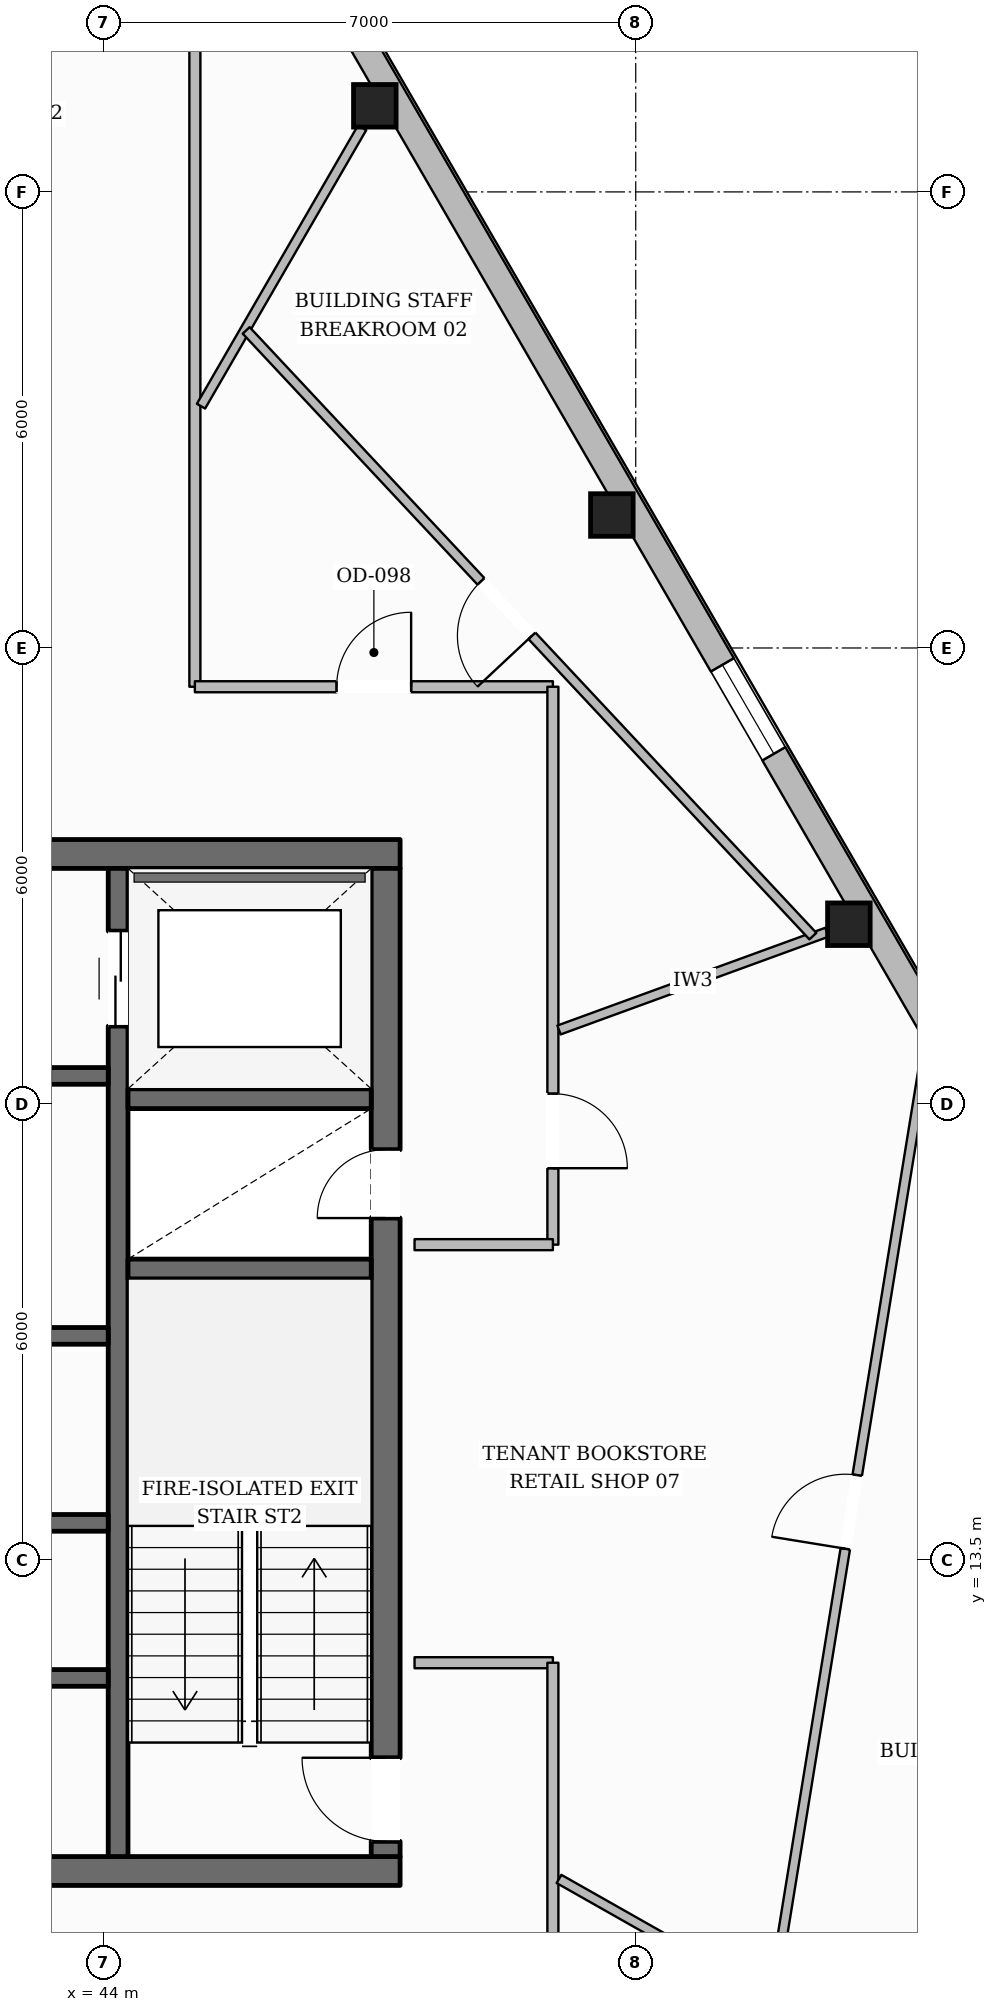
"""IFC4 building model, lengths in metres.
Left out: names, types, materials, properties, quantities, classifications, styles, units other than length and angle.
Written with IfcOpenShell. Run it as: python <this file> out.ifc"""

import sys

from ifc_helpers import new_model, si_unit, direction, frame, frame_2d, origin, origin_2d, place, context, subcontext, project, spatial, rectangle, hollow_rectangle, extrude, element, fill, save


model = new_model("IFC4")
c1 = context("Model", 3, precision=1e-05, world=origin(), true_north=direction((0.0, 1.0)))
c2 = subcontext(c1, "Body", "Model", "MODEL_VIEW")
j1 = project(units=[si_unit("LENGTHUNIT", "METRE"), si_unit("PLANEANGLEUNIT", "RADIAN")], contexts=[c1])
p1 = place(None, origin())
s1 = spatial("IfcSite", under=j1, at=p1, CompositionType="ELEMENT")
p2 = place(p1, origin())
s2 = spatial("IfcBuilding", under=s1, at=p2, CompositionType="ELEMENT")
p3 = place(p2, frame((0.0, 0.0, 247.2)))
s3 = spatial("IfcBuildingStorey", under=s2, at=p3, CompositionType="ELEMENT", Elevation=247.2)
p4 = place(p3, frame((28.1, 9.41, 0.0), z_axis=(0.0, 0.0, 1.0), x_axis=(1.0, 0.0, 0.0)))
e1 = element("IfcWall", 1, at=p4, inside=s3, PredefinedType="SOLIDWALL", context=c2, shape_type="SweptSolid", body=[
    extrude(rectangle(XDim=19.8, YDim=0.38, at=frame_2d((9.9, 0.0))), origin(), (0.0, 0.0, 1.0), 3.61),
])
p5 = place(p4, frame((10.4, 0.0, 0.0)))
e2 = element("IfcOpeningElement", 2, at=p5, cuts=e1, PredefinedType="OPENING", context=c2, shape_type="SweptSolid", body=[
    extrude(rectangle(XDim=1.4, YDim=2.2, at=frame_2d((0.7, 1.1))), frame((0.0, 0.2, 0.0), z_axis=(0.0, -1.0, 0.0), x_axis=(1.0, 0.0, 0.0)), (0.0, 0.0, 1.0), 0.4),
])
p6 = place(p3, frame((28.1, 22.79, 0.0), z_axis=(0.0, 0.0, 1.0), x_axis=(1.0, 0.0, 0.0)))
e3 = element("IfcWall", 3, at=p6, inside=s3, PredefinedType="SOLIDWALL", context=c2, shape_type="SweptSolid", body=[
    extrude(rectangle(XDim=19.8, YDim=0.38, at=frame_2d((9.9, 0.0))), origin(), (0.0, 0.0, 1.0), 3.61),
])
p7 = place(p6, frame((6.175, 0.0, 0.0)))
e4 = element("IfcOpeningElement", 4, at=p7, cuts=e3, PredefinedType="OPENING", context=c2, shape_type="SweptSolid", body=[
    extrude(rectangle(XDim=1.05, YDim=2.15, at=frame_2d((0.525, 1.075))), frame((0.0, 0.2, 0.0), z_axis=(0.0, -1.0, 0.0), x_axis=(1.0, 0.0, 0.0)), (0.0, 0.0, 1.0), 0.4),
])
p8 = place(p6, frame((12.575, 0.0, 0.0)))
e5 = element("IfcOpeningElement", 5, at=p8, cuts=e3, PredefinedType="OPENING", context=c2, shape_type="SweptSolid", body=[
    extrude(rectangle(XDim=1.05, YDim=2.15, at=frame_2d((0.525, 1.075))), frame((0.0, 0.2, 0.0), z_axis=(0.0, -1.0, 0.0), x_axis=(1.0, 0.0, 0.0)), (0.0, 0.0, 1.0), 0.4),
])
p9 = place(p3, frame((47.71, 9.6, 0.0), z_axis=(0.0, 0.0, 1.0), x_axis=(0.0, 1.0, 0.0)))
e6 = element("IfcWall", 6, at=p9, inside=s3, PredefinedType="SOLIDWALL", context=c2, shape_type="SweptSolid", body=[
    extrude(rectangle(XDim=13.0, YDim=0.38, at=frame_2d((6.5, 0.0))), origin(), (0.0, 0.0, 1.0), 3.61),
])
p10 = place(p9, frame((0.2, 0.0, 0.0)))
e7 = element("IfcOpeningElement", 7, at=p10, cuts=e6, PredefinedType="OPENING", context=c2, shape_type="SweptSolid", body=[
    extrude(rectangle(XDim=1.1, YDim=2.15, at=frame_2d((0.55, 1.075))), frame((0.0, 0.2, 0.0), z_axis=(0.0, -1.0, 0.0), x_axis=(1.0, 0.0, 0.0)), (0.0, 0.0, 1.0), 0.4),
])
p11 = place(p9, frame((8.4, 0.0, 0.0)))
e8 = element("IfcOpeningElement", 8, at=p11, cuts=e6, PredefinedType="OPENING", context=c2, shape_type="SweptSolid", body=[
    extrude(rectangle(XDim=0.9, YDim=2.1, at=frame_2d((0.45, 1.05))), frame((0.0, 0.2, 0.0), z_axis=(0.0, -1.0, 0.0), x_axis=(1.0, 0.0, 0.0)), (0.0, 0.0, 1.0), 0.4),
])
p12 = place(p3, frame((44.19, 9.6, 0.0), z_axis=(0.0, 0.0, 1.0), x_axis=(0.0, 1.0, 0.0)))
e9 = element("IfcWall", 9, at=p12, inside=s3, PredefinedType="SHEAR", context=c2, shape_type="SweptSolid", body=[
    extrude(rectangle(XDim=13.0, YDim=0.26, at=frame_2d((6.5, 0.0))), origin(), (0.0, 0.0, 1.0), 3.61),
])
p13 = place(p12, frame((10.925, 0.0, 0.0)))
e10 = element("IfcOpeningElement", 10, at=p13, cuts=e9, PredefinedType="OPENING", context=c2, shape_type="SweptSolid", body=[
    extrude(rectangle(XDim=1.25, YDim=2.25, at=frame_2d((0.625, 1.125))), frame((0.0, 0.14, 0.0), z_axis=(0.0, -1.0, 0.0), x_axis=(1.0, 0.0, 0.0)), (0.0, 0.0, 1.0), 0.28),
])
for number, where, z_axis, x_axis in (
    (11, (44.32, 17.33, 0.0), (0.0, 0.0, 1.0), (1.0, 0.0, 0.0)),
    (12, (44.32, 19.57, 0.0), (0.0, 0.0, 1.0), (1.0, 0.0, 0.0)),
):
    element("IfcWall", number, at=place(p3, frame(where, z_axis=z_axis, x_axis=x_axis)), inside=s3, PredefinedType="SHEAR", context=c2, shape_type="SweptSolid", body=[
        extrude(rectangle(XDim=3.2, YDim=0.26, at=frame_2d((1.6, 0.0))), origin(), (0.0, 0.0, 1.0), 3.61),
    ])
p14 = place(p3, frame((31.94, 19.87, 0.0), z_axis=(0.0, 0.0, 1.0), x_axis=(1.0, 0.0, 0.0)))
e13 = element("IfcWall", 13, at=p14, inside=s3, PredefinedType="SOLIDWALL", context=c2, shape_type="SweptSolid", body=[
    extrude(rectangle(XDim=12.12, YDim=0.22, at=frame_2d((6.06, 0.0))), origin(), (0.0, 0.0, 1.0), 3.61),
])
p15 = place(p14, frame((6.3, 0.0, 0.0)))
e14 = element("IfcOpeningElement", 14, at=p15, cuts=e13, PredefinedType="OPENING", context=c2, shape_type="SweptSolid", body=[
    extrude(rectangle(XDim=1.1, YDim=2.15, at=frame_2d((0.55, 1.075))), frame((0.0, 0.12, 0.0), z_axis=(0.0, -1.0, 0.0), x_axis=(1.0, 0.0, 0.0)), (0.0, 0.0, 1.0), 0.24),
])
p16 = place(p14, frame((8.23, 0.0, 0.0)))
e15 = element("IfcOpeningElement", 15, at=p16, cuts=e13, PredefinedType="OPENING", context=c2, shape_type="SweptSolid", body=[
    extrude(rectangle(XDim=0.9, YDim=2.1, at=frame_2d((0.45, 1.05))), frame((0.0, 0.12, 0.0), z_axis=(0.0, -1.0, 0.0), x_axis=(1.0, 0.0, 0.0)), (0.0, 0.0, 1.0), 0.24),
])
p17 = place(p14, frame((10.45, 0.0, 0.0)))
e16 = element("IfcOpeningElement", 16, at=p17, cuts=e13, PredefinedType="OPENING", context=c2, shape_type="SweptSolid", body=[
    extrude(rectangle(XDim=0.9, YDim=2.1, at=frame_2d((0.45, 1.05))), frame((0.0, 0.12, 0.0), z_axis=(0.0, -1.0, 0.0), x_axis=(1.0, 0.0, 0.0)), (0.0, 0.0, 1.0), 0.24),
])
p18 = place(p3, frame((31.94, 16.45, 0.0), z_axis=(0.0, 0.0, 1.0), x_axis=(1.0, 0.0, 0.0)))
e17 = element("IfcWall", 17, at=p18, inside=s3, PredefinedType="SOLIDWALL", context=c2, shape_type="SweptSolid", body=[
    extrude(rectangle(XDim=12.12, YDim=0.22, at=frame_2d((6.06, 0.0))), origin(), (0.0, 0.0, 1.0), 3.61),
])
p19 = place(p3, frame((31.94, 13.99, 0.0), z_axis=(0.0, 0.0, 1.0), x_axis=(1.0, 0.0, 0.0)))
e18 = element("IfcWall", 18, at=p19, inside=s3, PredefinedType="SOLIDWALL", context=c2, shape_type="SweptSolid", body=[
    extrude(rectangle(XDim=12.12, YDim=0.22, at=frame_2d((6.06, 0.0))), origin(), (0.0, 0.0, 1.0), 3.61),
])
p20 = place(p19, frame((3.11, 0.0, 0.0)))
e19 = element("IfcOpeningElement", 19, at=p20, cuts=e18, PredefinedType="OPENING", context=c2, shape_type="SweptSolid", body=[
    extrude(rectangle(XDim=0.9, YDim=2.1, at=frame_2d((0.45, 1.05))), frame((0.0, 0.12, 0.0), z_axis=(0.0, -1.0, 0.0), x_axis=(1.0, 0.0, 0.0)), (0.0, 0.0, 1.0), 0.24),
])
p21 = place(p19, frame((9.21, 0.0, 0.0)))
e20 = element("IfcOpeningElement", 20, at=p21, cuts=e18, PredefinedType="OPENING", context=c2, shape_type="SweptSolid", body=[
    extrude(rectangle(XDim=0.9, YDim=2.1, at=frame_2d((0.45, 1.05))), frame((0.0, 0.12, 0.0), z_axis=(0.0, -1.0, 0.0), x_axis=(1.0, 0.0, 0.0)), (0.0, 0.0, 1.0), 0.24),
])
p22 = place(p3, frame((40.28, 11.95, 0.0), z_axis=(0.0, 0.0, 1.0), x_axis=(1.0, 0.0, 0.0)))
e21 = element("IfcWall", 21, at=p22, inside=s3, PredefinedType="SOLIDWALL", context=c2, shape_type="SweptSolid", body=[
    extrude(rectangle(XDim=3.78, YDim=0.22, at=frame_2d((1.89, 0.0))), origin(), (0.0, 0.0, 1.0), 3.61),
])
p23 = place(p22, frame((1.55, 0.0, 0.0)))
e22 = element("IfcOpeningElement", 22, at=p23, cuts=e21, PredefinedType="OPENING", context=c2, shape_type="SweptSolid", body=[
    extrude(rectangle(XDim=0.9, YDim=2.1, at=frame_2d((0.45, 1.05))), frame((0.0, 0.12, 0.0), z_axis=(0.0, -1.0, 0.0), x_axis=(1.0, 0.0, 0.0)), (0.0, 0.0, 1.0), 0.24),
])
for number, where, z_axis, x_axis in (
    (23, (53.804, 21.866, 0.0), (0.0, 0.0, 1.0), (1.0, 0.0, 0.0)),
    (24, (50.686, 27.249, 0.0), (0.0, 0.0, 1.0), (1.0, 0.0, 0.0)),
    (25, (47.567, 32.633, 0.0), (0.0, 0.0, 1.0), (1.0, 0.0, 0.0)),
):
    element("IfcColumn", number, at=place(p3, frame(where, z_axis=z_axis, x_axis=x_axis)), inside=s3, PredefinedType="COLUMN", context=c2, shape_type="SweptSolid", body=[
        extrude(hollow_rectangle(XDim=0.56, YDim=0.56, WallThickness=0.025, at=origin_2d()), origin(), (0.0, 0.0, 1.0), 3.61),
    ])
p24 = place(p3, frame((41.327, 43.945, 0.0), z_axis=(0.0, 0.0, 1.0), x_axis=(0.501242173683, -0.865307045691, 0.0)))
e26 = element("IfcWall", 26, at=p24, inside=s3, PredefinedType="STANDARD", context=c2, shape_type="SweptSolid", body=[
    extrude(rectangle(XDim=38.277, YDim=0.35, at=frame_2d((19.138, 0.0))), origin(), (0.0, 0.0, 1.0), 3.196),
])
p25 = place(p24, frame((9.169, 0.0, 0.0)))
e27 = element("IfcOpeningElement", 27, at=p25, cuts=e26, PredefinedType="OPENING", context=c2, shape_type="SweptSolid", body=[
    extrude(rectangle(XDim=1.0, YDim=2.2, at=frame_2d((0.5, 1.1))), frame((0.0, 0.185, 0.0), z_axis=(0.0, -1.0, 0.0), x_axis=(1.0, 0.0, 0.0)), (0.0, 0.0, 1.0), 0.37),
])
p26 = place(p24, frame((34.016, 0.0, 0.65)))
e28 = element("IfcOpeningElement", 28, at=p26, cuts=e26, PredefinedType="OPENING", context=c2, shape_type="SweptSolid", body=[
    extrude(rectangle(XDim=1.35, YDim=1.75, at=frame_2d((0.675, 0.875))), frame((0.0, 0.185, 0.0), z_axis=(0.0, -1.0, 0.0), x_axis=(1.0, 0.0, 0.0)), (0.0, 0.0, 1.0), 0.37),
])
p27 = place(p24, frame((27.795, 0.0, 0.65)))
e29 = element("IfcOpeningElement", 29, at=p27, cuts=e26, PredefinedType="OPENING", context=c2, shape_type="SweptSolid", body=[
    extrude(rectangle(XDim=1.35, YDim=1.75, at=frame_2d((0.675, 0.875))), frame((0.0, 0.185, 0.0), z_axis=(0.0, -1.0, 0.0), x_axis=(1.0, 0.0, 0.0)), (0.0, 0.0, 1.0), 0.37),
])
p28 = place(p24, frame((21.573, 0.0, 0.65)))
e30 = element("IfcOpeningElement", 30, at=p28, cuts=e26, PredefinedType="OPENING", context=c2, shape_type="SweptSolid", body=[
    extrude(rectangle(XDim=1.35, YDim=1.75, at=frame_2d((0.675, 0.875))), frame((0.0, 0.185, 0.0), z_axis=(0.0, -1.0, 0.0), x_axis=(1.0, 0.0, 0.0)), (0.0, 0.0, 1.0), 0.37),
])
p29 = place(p24, frame((2.909, 0.0, 0.65)))
e31 = element("IfcOpeningElement", 31, at=p29, cuts=e26, PredefinedType="OPENING", context=c2, shape_type="SweptSolid", body=[
    extrude(rectangle(XDim=1.35, YDim=1.75, at=frame_2d((0.675, 0.875))), frame((0.0, 0.185, 0.0), z_axis=(0.0, -1.0, 0.0), x_axis=(1.0, 0.0, 0.0)), (0.0, 0.0, 1.0), 0.37),
])
p30 = place(p3, frame((45.2, 34.4, 0.0), z_axis=(0.0, 0.0, 1.0), x_axis=(0.0, -1.0, 0.0)))
e32 = element("IfcWall", 32, at=p30, inside=s3, PredefinedType="PARTITIONING", context=c2, shape_type="SweptSolid", body=[
    extrude(rectangle(XDim=9.41, YDim=0.145, at=frame_2d((4.705, 0.0))), origin(), (0.0, 0.0, 1.0), 3.61),
])
p31 = place(p3, frame((45.2, 24.99, 0.0), z_axis=(0.0, 0.0, 1.0), x_axis=(1.0, 0.0, 0.0)))
e33 = element("IfcWall", 33, at=p31, inside=s3, PredefinedType="PARTITIONING", context=c2, shape_type="SweptSolid", body=[
    extrude(rectangle(XDim=4.71, YDim=0.145, at=frame_2d((2.355, 0.0))), origin(), (0.0, 0.0, 1.0), 3.61),
])
p32 = place(p31, frame((1.865, 0.0, 0.0)))
e34 = element("IfcOpeningElement", 34, at=p32, cuts=e33, PredefinedType="OPENING", context=c2, shape_type="SweptSolid", body=[
    extrude(rectangle(XDim=0.98, YDim=2.15, at=frame_2d((0.49, 1.075))), frame((0.0, 0.083, 0.0), z_axis=(0.0, -1.0, 0.0), x_axis=(1.0, 0.0, 0.0)), (0.0, 0.0, 1.0), 0.165),
])
p33 = place(p3, frame((49.91, 24.99, 0.0), z_axis=(0.0, 0.0, 1.0), x_axis=(0.0, -1.0, 0.0)))
e35 = element("IfcWall", 35, at=p33, inside=s3, PredefinedType="PARTITIONING", context=c2, shape_type="SweptSolid", body=[
    extrude(rectangle(XDim=7.34, YDim=0.145, at=frame_2d((3.67, 0.0))), origin(), (0.0, 0.0, 1.0), 3.349),
])
p34 = place(p33, frame((5.354, 0.0, 0.0)))
e36 = element("IfcOpeningElement", 36, at=p34, cuts=e35, PredefinedType="OPENING", context=c2, shape_type="SweptSolid", body=[
    extrude(rectangle(XDim=0.98, YDim=2.15, at=frame_2d((0.49, 1.075))), frame((0.0, 0.083, 0.0), z_axis=(0.0, -1.0, 0.0), x_axis=(1.0, 0.0, 0.0)), (0.0, 0.0, 1.0), 0.165),
])
for number, where, z_axis, x_axis in (
    (37, (49.91, 17.65, 0.0), (0.0, 0.0, 1.0), (-1.0, 0.0, 0.0)),
    (38, (48.09, 12.15, 0.0), (0.0, 0.0, 1.0), (1.0, 0.0, 0.0)),
):
    element("IfcWall", number, at=place(p3, frame(where, z_axis=z_axis, x_axis=x_axis)), inside=s3, PredefinedType="PARTITIONING", context=c2, shape_type="SweptSolid", body=[
        extrude(rectangle(XDim=1.82, YDim=0.145, at=frame_2d((0.91, 0.0))), origin(), (0.0, 0.0, 1.0), 3.61),
    ])
p35 = place(p3, frame((49.91, 12.15, 0.0), z_axis=(0.0, 0.0, 1.0), x_axis=(0.0, -1.0, 0.0)))
e39 = element("IfcWall", 39, at=p35, inside=s3, PredefinedType="PARTITIONING", context=c2, shape_type="SweptSolid", body=[
    extrude(rectangle(XDim=4.94, YDim=0.145, at=frame_2d((2.47, 0.0))), origin(), (0.0, 0.0, 1.0), 3.61),
])
p36 = place(p3, frame((49.99, 20.474, 0.0), z_axis=(0.0, 0.0, 1.0), x_axis=(0.939443445382, 0.342703972735, 0.0)))
e40 = element("IfcWall", 40, at=p36, inside=s3, PredefinedType="PARTITIONING", context=c2, shape_type="SweptSolid", body=[
    extrude(rectangle(XDim=3.753, YDim=0.125, at=frame_2d((1.876, 0.0))), origin(), (0.0, 0.0, 1.0), 3.61),
])
p37 = place(p3, frame((45.281, 28.681, 0.0), z_axis=(0.0, 0.0, 1.0), x_axis=(0.500877108651, 0.8655184123, 0.0)))
e41 = element("IfcWall", 41, at=p37, inside=s3, PredefinedType="PARTITIONING", context=c2, shape_type="SweptSolid", body=[
    extrude(rectangle(XDim=4.233, YDim=0.125, at=frame_2d((2.116, 0.0))), origin(), (0.0, 0.0, 1.0), 3.61),
])
p38 = place(p3, frame((49.99, 9.305, 0.0), z_axis=(0.0, 0.0, 1.0), x_axis=(0.870028652136, -0.49300116071, 0.0)))
e42 = element("IfcWall", 42, at=p38, inside=s3, PredefinedType="PARTITIONING", context=c2, shape_type="SweptSolid", body=[
    extrude(rectangle(XDim=7.557, YDim=0.125, at=frame_2d((3.779, 0.0))), origin(), (0.0, 0.0, 1.0), 3.246),
])
p39 = place(p3, frame((53.331, 21.709, 0.0), z_axis=(0.0, 0.0, 1.0), x_axis=(-0.683203310533, 0.730228208491, 0.0)))
e43 = element("IfcWall", 43, at=p39, inside=s3, PredefinedType="PARTITIONING", context=c2, shape_type="SweptSolid", body=[
    extrude(rectangle(XDim=10.913, YDim=0.125, at=frame_2d((5.457, 0.0))), origin(), (0.0, 0.0, 1.0), 3.349),
])
p40 = place(p39, frame((5.411, 0.0, 0.0)))
e44 = element("IfcOpeningElement", 44, at=p40, cuts=e43, PredefinedType="OPENING", context=c2, shape_type="SweptSolid", body=[
    extrude(rectangle(XDim=0.98, YDim=2.15, at=frame_2d((0.49, 1.075))), frame((0.0, 0.073, 0.0), z_axis=(0.0, -1.0, 0.0), x_axis=(1.0, 0.0, 0.0)), (0.0, 0.0, 1.0), 0.145),
])
p41 = place(p3, frame((52.796, 7.733, 0.0), z_axis=(0.0, 0.0, 1.0), x_axis=(0.160388372881, 0.987053985274, 0.0)))
e45 = element("IfcWall", 45, at=p41, inside=s3, PredefinedType="PARTITIONING", context=c2, shape_type="SweptSolid", body=[
    extrude(rectangle(XDim=12.748, YDim=0.125, at=frame_2d((6.374, 0.0))), origin(), (0.0, 0.0, 1.0), 3.349),
])
p42 = place(p41, frame((5.995, 0.0, 0.0)))
e46 = element("IfcOpeningElement", 46, at=p42, cuts=e45, PredefinedType="OPENING", context=c2, shape_type="SweptSolid", body=[
    extrude(rectangle(XDim=0.98, YDim=2.15, at=frame_2d((0.49, 1.075))), frame((0.0, 0.073, 0.0), z_axis=(0.0, -1.0, 0.0), x_axis=(1.0, 0.0, 0.0)), (0.0, 0.0, 1.0), 0.145),
])
p43 = place(p28, origin())
e47 = element("IfcWindow", 47, at=p43, inside=s3, PartitioningType="SINGLE_PANEL", PredefinedType="WINDOW", context=c2, shape_type="SweptSolid", body=[
    extrude(rectangle(XDim=1.35, YDim=1.75, at=frame_2d((0.675, 0.875))), frame((0.0, 0.03, 0.0), z_axis=(0.0, -1.0, 0.0), x_axis=(1.0, 0.0, 0.0)), (0.0, 0.0, 1.0), 0.06),
])
fill(e30, e47)
p44 = place(p10, origin())
e48 = element("IfcDoor", 48, at=p44, inside=s3, OperationType="SINGLE_SWING_RIGHT", PredefinedType="DOOR", context=c2, shape_type="SweptSolid", body=[
    extrude(rectangle(XDim=1.1, YDim=2.15, at=frame_2d((0.55, 1.075))), frame((0.0, 0.025, 0.0), z_axis=(0.0, -1.0, 0.0), x_axis=(1.0, 0.0, 0.0)), (0.0, 0.0, 1.0), 0.05),
])
fill(e7, e48)
p45 = place(p11, origin())
e49 = element("IfcDoor", 49, at=p45, inside=s3, OperationType="SINGLE_SWING_LEFT", PredefinedType="DOOR", context=c2, shape_type="SweptSolid", body=[
    extrude(rectangle(XDim=0.9, YDim=2.1, at=frame_2d((0.45, 1.05))), frame((0.0, 0.025, 0.0), z_axis=(0.0, -1.0, 0.0), x_axis=(1.0, 0.0, 0.0)), (0.0, 0.0, 1.0), 0.05),
])
fill(e8, e49)
p46 = place(p13, origin())
e50 = element("IfcDoor", 50, at=p46, inside=s3, OperationType="DOUBLE_DOOR_SLIDING", PredefinedType="DOOR", context=c2, shape_type="SweptSolid", body=[
    extrude(rectangle(XDim=1.25, YDim=2.25, at=frame_2d((0.625, 1.125))), frame((0.0, 0.025, 0.0), z_axis=(0.0, -1.0, 0.0), x_axis=(1.0, 0.0, 0.0)), (0.0, 0.0, 1.0), 0.05),
])
fill(e10, e50)
p47 = place(p32, origin())
e51 = element("IfcDoor", 51, at=p47, inside=s3, OperationType="SINGLE_SWING_RIGHT", PredefinedType="DOOR", context=c2, shape_type="SweptSolid", body=[
    extrude(rectangle(XDim=0.98, YDim=2.15, at=frame_2d((0.49, 1.075))), frame((0.0, 0.025, 0.0), z_axis=(0.0, -1.0, 0.0), x_axis=(1.0, 0.0, 0.0)), (0.0, 0.0, 1.0), 0.05),
])
fill(e34, e51)
p48 = place(p40, origin())
e52 = element("IfcDoor", 52, at=p48, inside=s3, OperationType="SINGLE_SWING_LEFT", PredefinedType="DOOR", context=c2, shape_type="SweptSolid", body=[
    extrude(rectangle(XDim=0.98, YDim=2.15, at=frame_2d((0.49, 1.075))), frame((0.0, 0.025, 0.0), z_axis=(0.0, -1.0, 0.0), x_axis=(1.0, 0.0, 0.0)), (0.0, 0.0, 1.0), 0.05),
])
fill(e44, e52)
p49 = place(p34, origin())
e53 = element("IfcDoor", 53, at=p49, inside=s3, OperationType="SINGLE_SWING_RIGHT", PredefinedType="DOOR", context=c2, shape_type="SweptSolid", body=[
    extrude(rectangle(XDim=0.98, YDim=2.15, at=frame_2d((0.49, 1.075))), frame((0.0, 0.025, 0.0), z_axis=(0.0, -1.0, 0.0), x_axis=(1.0, 0.0, 0.0)), (0.0, 0.0, 1.0), 0.05),
])
fill(e36, e53)
p50 = place(p42, origin())
e54 = element("IfcDoor", 54, at=p50, inside=s3, OperationType="SINGLE_SWING_LEFT", PredefinedType="DOOR", context=c2, shape_type="SweptSolid", body=[
    extrude(rectangle(XDim=0.98, YDim=2.15, at=frame_2d((0.49, 1.075))), frame((0.0, 0.025, 0.0), z_axis=(0.0, -1.0, 0.0), x_axis=(1.0, 0.0, 0.0)), (0.0, 0.0, 1.0), 0.05),
])
fill(e46, e54)
save(model, sys.argv[1])
